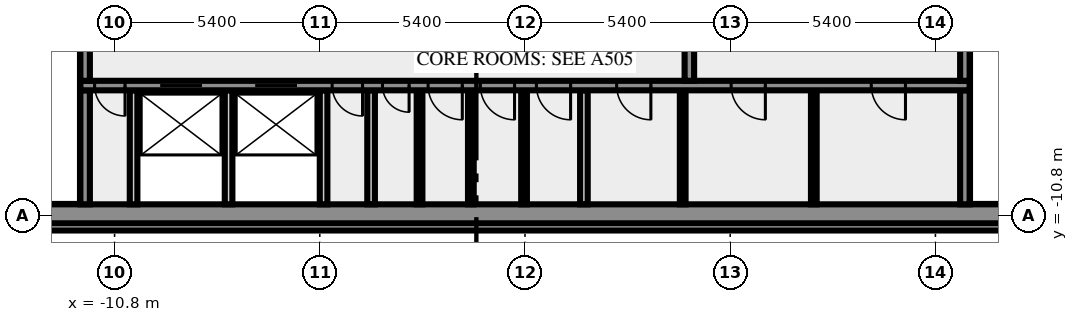
"""IFC4 building model, lengths in metres.
Left out: names, types, materials, properties, quantities, classifications, styles, units other than length and angle.
Written with IfcOpenShell. Run it as: python <this file> out.ifc"""

import sys

from ifc_helpers import new_model, si_unit, direction, frame, frame_2d, origin, place, context, subcontext, project, spatial, rectangle, extrude, element, fill, save


model = new_model("IFC4")
c1 = context("Model", 3, precision=1e-05, world=origin(), true_north=direction((0.0, 1.0)))
c2 = subcontext(c1, "Body", "Model", "MODEL_VIEW")
j1 = project(units=[si_unit("LENGTHUNIT", "METRE"), si_unit("PLANEANGLEUNIT", "RADIAN")], contexts=[c1])
p1 = place(None, origin())
s1 = spatial("IfcSite", under=j1, at=p1, CompositionType="ELEMENT")
p2 = place(p1, origin())
s2 = spatial("IfcBuilding", under=s1, at=p2, CompositionType="ELEMENT")
p3 = place(p2, frame((0.0, 0.0, 253.0)))
s3 = spatial("IfcBuildingStorey", under=s2, at=p3, CompositionType="ELEMENT", Elevation=253.0)
p4 = place(p3, frame((-17.444, -11.088, 0.0), z_axis=(0.0, 0.0, 1.0), x_axis=(1.0, 0.0, 0.0)))
e1 = element("IfcWall", 1, at=p4, inside=s3, PredefinedType="SOLIDWALL", context=c2, shape_type="SweptSolid", body=[
    extrude(rectangle(XDim=34.888, YDim=0.2, at=frame_2d((17.444, 0.0))), origin(), (0.0, 0.0, 1.0), 3.65),
])
p5 = place(p3, frame((-20.0, -10.75, 0.0), z_axis=(0.0, 0.0, 1.0), x_axis=(1.0, 0.0, 0.0)))
e2 = element("IfcWall", 2, at=p5, inside=s3, PredefinedType="SHEAR", context=c2, shape_type="SweptSolid", body=[
    extrude(rectangle(XDim=40.0, YDim=0.5, at=frame_2d((20.0, 0.0))), origin(), (0.0, 0.0, 1.0), 3.65),
])
p6 = place(p5, frame((0.8, 0.0, 1.0)))
e3 = element("IfcOpeningElement", 3, at=p6, cuts=e2, PredefinedType="OPENING", context=c2, shape_type="SweptSolid", body=[
    extrude(rectangle(XDim=1.2, YDim=1.2, at=frame_2d((0.6, 0.6))), frame((0.0, 0.26, 0.0), z_axis=(0.0, -1.0, 0.0), x_axis=(1.0, 0.0, 0.0)), (0.0, 0.0, 1.0), 0.52),
])
p7 = place(p5, frame((38.0, 0.0, 1.0)))
e4 = element("IfcOpeningElement", 4, at=p7, cuts=e2, PredefinedType="OPENING", context=c2, shape_type="SweptSolid", body=[
    extrude(rectangle(XDim=1.2, YDim=1.2, at=frame_2d((0.6, 0.6))), frame((0.0, 0.26, 0.0), z_axis=(0.0, -1.0, 0.0), x_axis=(1.0, 0.0, 0.0)), (0.0, 0.0, 1.0), 0.52),
])
p8 = place(p3, frame((-11.575, -10.5, 0.0), z_axis=(0.0, 0.0, 1.0), x_axis=(0.0, 1.0, 0.0)))
e5 = element("IfcWall", 5, at=p8, inside=s3, PredefinedType="SHEAR", context=c2, shape_type="SweptSolid", body=[
    extrude(rectangle(XDim=3.0, YDim=0.25, at=frame_2d((1.5, 0.0))), origin(), (0.0, 0.0, 1.0), 3.65),
])
for number, where, z_axis, x_axis in (
    (6, (-10.3, -10.5, 0.0), (0.0, 0.0, 1.0), (0.0, 1.0, 0.0)),
    (7, (-7.8, -10.5, 0.0), (0.0, 0.0, 1.0), (0.0, 1.0, 0.0)),
    (8, (-5.3, -10.5, 0.0), (0.0, 0.0, 1.0), (0.0, 1.0, 0.0)),
    (9, (-4.05, -10.5, 0.0), (0.0, 0.0, 1.0), (0.0, 1.0, 0.0)),
):
    element("IfcWall", number, at=place(p3, frame(where, z_axis=z_axis, x_axis=x_axis)), inside=s3, PredefinedType="SOLIDWALL", context=c2, shape_type="SweptSolid", body=[
        extrude(rectangle(XDim=3.0, YDim=0.2, at=frame_2d((1.5, 0.0))), origin(), (0.0, 0.0, 1.0), 3.65),
    ])
for number, where, z_axis, x_axis in (
    (10, (-2.775, -10.5, 0.0), (0.0, 0.0, 1.0), (0.0, 1.0, 0.0)),
    (11, (-1.425, -10.5, 0.0), (0.0, 0.0, 1.0), (0.0, 1.0, 0.0)),
    (12, (-0.025, -10.5, 0.0), (0.0, 0.0, 1.0), (0.0, 1.0, 0.0)),
):
    element("IfcWall", number, at=place(p3, frame(where, z_axis=z_axis, x_axis=x_axis)), inside=s3, PredefinedType="PARTITIONING", context=c2, shape_type="SweptSolid", body=[
        extrude(rectangle(XDim=3.0, YDim=0.15, at=frame_2d((1.5, 0.0))), origin(), (0.0, 0.0, 1.0), 3.65),
    ])
p9 = place(p3, frame((1.55, -10.5, 0.0), z_axis=(0.0, 0.0, 1.0), x_axis=(0.0, 1.0, 0.0)))
e13 = element("IfcWall", 13, at=p9, inside=s3, PredefinedType="SOLIDWALL", context=c2, shape_type="SweptSolid", body=[
    extrude(rectangle(XDim=3.0, YDim=0.2, at=frame_2d((1.5, 0.0))), origin(), (0.0, 0.0, 1.0), 3.65),
])
for number, where, z_axis, x_axis in (
    (14, (4.15, -10.5, 0.0), (0.0, 0.0, 1.0), (0.0, 1.0, 0.0)),
    (15, (7.6, -10.5, 0.0), (0.0, 0.0, 1.0), (0.0, 1.0, 0.0)),
):
    element("IfcWall", number, at=place(p3, frame(where, z_axis=z_axis, x_axis=x_axis)), inside=s3, PredefinedType="PARTITIONING", context=c2, shape_type="SweptSolid", body=[
        extrude(rectangle(XDim=3.0, YDim=0.15, at=frame_2d((1.5, 0.0))), origin(), (0.0, 0.0, 1.0), 3.65),
    ])
p10 = place(p3, frame((11.575, -10.5, 0.0), z_axis=(0.0, 0.0, 1.0), x_axis=(0.0, 1.0, 0.0)))
e16 = element("IfcWall", 16, at=p10, inside=s3, PredefinedType="SHEAR", context=c2, shape_type="SweptSolid", body=[
    extrude(rectangle(XDim=3.0, YDim=0.25, at=frame_2d((1.5, 0.0))), origin(), (0.0, 0.0, 1.0), 3.65),
])
p11 = place(p3, frame((11.7, -7.375, 0.0), z_axis=(0.0, 0.0, 1.0), x_axis=(-1.0, 0.0, 0.0)))
e17 = element("IfcWall", 17, at=p11, inside=s3, PredefinedType="SHEAR", context=c2, shape_type="SweptSolid", body=[
    extrude(rectangle(XDim=23.4, YDim=0.25, at=frame_2d((11.7, 0.0))), origin(), (0.0, 0.0, 1.0), 3.65),
])
p12 = place(p11, frame((22.225, 0.0, 0.0)))
e18 = element("IfcOpeningElement", 18, at=p12, cuts=e17, PredefinedType="OPENING", context=c2, shape_type="SweptSolid", body=[
    extrude(rectangle(XDim=0.8, YDim=2.1, at=frame_2d((0.4, 1.05))), frame((0.0, 0.135, 0.0), z_axis=(0.0, -1.0, 0.0), x_axis=(1.0, 0.0, 0.0)), (0.0, 0.0, 1.0), 0.27),
])
p13 = place(p11, frame((20.2, 0.0, 0.0)))
e19 = element("IfcOpeningElement", 19, at=p13, cuts=e17, PredefinedType="OPENING", context=c2, shape_type="SweptSolid", body=[
    extrude(rectangle(XDim=1.1, YDim=2.1, at=frame_2d((0.55, 1.05))), frame((0.0, 0.135, 0.0), z_axis=(0.0, -1.0, 0.0), x_axis=(1.0, 0.0, 0.0)), (0.0, 0.0, 1.0), 0.27),
])
p14 = place(p11, frame((17.7, 0.0, 0.0)))
e20 = element("IfcOpeningElement", 20, at=p14, cuts=e17, PredefinedType="OPENING", context=c2, shape_type="SweptSolid", body=[
    extrude(rectangle(XDim=1.1, YDim=2.1, at=frame_2d((0.55, 1.05))), frame((0.0, 0.135, 0.0), z_axis=(0.0, -1.0, 0.0), x_axis=(1.0, 0.0, 0.0)), (0.0, 0.0, 1.0), 0.27),
])
p15 = place(p11, frame((15.975, 0.0, 0.0)))
e21 = element("IfcOpeningElement", 21, at=p15, cuts=e17, PredefinedType="OPENING", context=c2, shape_type="SweptSolid", body=[
    extrude(rectangle(XDim=0.8, YDim=2.1, at=frame_2d((0.4, 1.05))), frame((0.0, 0.135, 0.0), z_axis=(0.0, -1.0, 0.0), x_axis=(1.0, 0.0, 0.0)), (0.0, 0.0, 1.0), 0.27),
])
p16 = place(p11, frame((14.75, 0.0, 0.0)))
e22 = element("IfcOpeningElement", 22, at=p16, cuts=e17, PredefinedType="OPENING", context=c2, shape_type="SweptSolid", body=[
    extrude(rectangle(XDim=0.7, YDim=2.1, at=frame_2d((0.35, 1.05))), frame((0.0, 0.135, 0.0), z_axis=(0.0, -1.0, 0.0), x_axis=(1.0, 0.0, 0.0)), (0.0, 0.0, 1.0), 0.27),
])
p17 = place(p11, frame((13.35, 0.0, 0.0)))
e23 = element("IfcOpeningElement", 23, at=p17, cuts=e17, PredefinedType="OPENING", context=c2, shape_type="SweptSolid", body=[
    extrude(rectangle(XDim=0.9, YDim=2.1, at=frame_2d((0.45, 1.05))), frame((0.0, 0.135, 0.0), z_axis=(0.0, -1.0, 0.0), x_axis=(1.0, 0.0, 0.0)), (0.0, 0.0, 1.0), 0.27),
])
p18 = place(p11, frame((11.975, 0.0, 0.0)))
e24 = element("IfcOpeningElement", 24, at=p18, cuts=e17, PredefinedType="OPENING", context=c2, shape_type="SweptSolid", body=[
    extrude(rectangle(XDim=0.9, YDim=2.1, at=frame_2d((0.45, 1.05))), frame((0.0, 0.135, 0.0), z_axis=(0.0, -1.0, 0.0), x_axis=(1.0, 0.0, 0.0)), (0.0, 0.0, 1.0), 0.27),
])
p19 = place(p11, frame((10.5, 0.0, 0.0)))
e25 = element("IfcOpeningElement", 25, at=p19, cuts=e17, PredefinedType="OPENING", context=c2, shape_type="SweptSolid", body=[
    extrude(rectangle(XDim=0.9, YDim=2.1, at=frame_2d((0.45, 1.05))), frame((0.0, 0.135, 0.0), z_axis=(0.0, -1.0, 0.0), x_axis=(1.0, 0.0, 0.0)), (0.0, 0.0, 1.0), 0.27),
])
p20 = place(p11, frame((8.388, 0.0, 0.0)))
e26 = element("IfcOpeningElement", 26, at=p20, cuts=e17, PredefinedType="OPENING", context=c2, shape_type="SweptSolid", body=[
    extrude(rectangle(XDim=0.9, YDim=2.1, at=frame_2d((0.45, 1.05))), frame((0.0, 0.135, 0.0), z_axis=(0.0, -1.0, 0.0), x_axis=(1.0, 0.0, 0.0)), (0.0, 0.0, 1.0), 0.27),
])
p21 = place(p11, frame((5.375, 0.0, 0.0)))
e27 = element("IfcOpeningElement", 27, at=p21, cuts=e17, PredefinedType="OPENING", context=c2, shape_type="SweptSolid", body=[
    extrude(rectangle(XDim=0.9, YDim=2.1, at=frame_2d((0.45, 1.05))), frame((0.0, 0.135, 0.0), z_axis=(0.0, -1.0, 0.0), x_axis=(1.0, 0.0, 0.0)), (0.0, 0.0, 1.0), 0.27),
])
p22 = place(p11, frame((1.688, 0.0, 0.0)))
e28 = element("IfcOpeningElement", 28, at=p22, cuts=e17, PredefinedType="OPENING", context=c2, shape_type="SweptSolid", body=[
    extrude(rectangle(XDim=0.9, YDim=2.1, at=frame_2d((0.45, 1.05))), frame((0.0, 0.135, 0.0), z_axis=(0.0, -1.0, 0.0), x_axis=(1.0, 0.0, 0.0)), (0.0, 0.0, 1.0), 0.27),
])
p23 = place(p3, frame((-11.575, -7.25, 0.0), z_axis=(0.0, 0.0, 1.0), x_axis=(0.0, 1.0, 0.0)))
e29 = element("IfcWall", 29, at=p23, inside=s3, PredefinedType="SHEAR", context=c2, shape_type="SweptSolid", body=[
    extrude(rectangle(XDim=1.0, YDim=0.25, at=frame_2d((0.5, 0.0))), origin(), (0.0, 0.0, 1.0), 3.65),
])
p24 = place(p3, frame((4.325, -7.25, 0.0), z_axis=(0.0, 0.0, 1.0), x_axis=(0.0, 1.0, 0.0)))
e30 = element("IfcWall", 30, at=p24, inside=s3, PredefinedType="SHEAR", context=c2, shape_type="SweptSolid", body=[
    extrude(rectangle(XDim=3.0, YDim=0.25, at=frame_2d((1.5, 0.0))), origin(), (0.0, 0.0, 1.0), 3.65),
])
p25 = place(p24, frame((0.8, 0.0, 0.0)))
e31 = element("IfcOpeningElement", 31, at=p25, cuts=e30, PredefinedType="OPENING", context=c2, shape_type="SweptSolid", body=[
    extrude(rectangle(XDim=1.4, YDim=2.1, at=frame_2d((0.7, 1.05))), frame((0.0, 0.135, 0.0), z_axis=(0.0, -1.0, 0.0), x_axis=(1.0, 0.0, 0.0)), (0.0, 0.0, 1.0), 0.27),
])
p26 = place(p3, frame((11.575, -7.25, 0.0), z_axis=(0.0, 0.0, 1.0), x_axis=(0.0, 1.0, 0.0)))
e32 = element("IfcWall", 32, at=p26, inside=s3, PredefinedType="SHEAR", context=c2, shape_type="SweptSolid", body=[
    extrude(rectangle(XDim=1.0, YDim=0.25, at=frame_2d((0.5, 0.0))), origin(), (0.0, 0.0, 1.0), 3.65),
])
p27 = place(p12, origin())
e33 = element("IfcDoor", 33, at=p27, inside=s3, OperationType="SINGLE_SWING_RIGHT", PredefinedType="DOOR", context=c2, shape_type="SweptSolid", body=[
    extrude(rectangle(XDim=0.8, YDim=2.1, at=frame_2d((0.4, 1.05))), frame((0.0, 0.025, 0.0), z_axis=(0.0, -1.0, 0.0), x_axis=(1.0, 0.0, 0.0)), (0.0, 0.0, 1.0), 0.05),
])
fill(e18, e33)
p28 = place(p13, origin())
e34 = element("IfcDoor", 34, at=p28, inside=s3, OperationType="DOUBLE_DOOR_SLIDING", PredefinedType="DOOR", context=c2, shape_type="SweptSolid", body=[
    extrude(rectangle(XDim=1.1, YDim=2.1, at=frame_2d((0.55, 1.05))), frame((0.0, 0.025, 0.0), z_axis=(0.0, -1.0, 0.0), x_axis=(1.0, 0.0, 0.0)), (0.0, 0.0, 1.0), 0.05),
])
fill(e19, e34)
p29 = place(p14, origin())
e35 = element("IfcDoor", 35, at=p29, inside=s3, OperationType="DOUBLE_DOOR_SLIDING", PredefinedType="DOOR", context=c2, shape_type="SweptSolid", body=[
    extrude(rectangle(XDim=1.1, YDim=2.1, at=frame_2d((0.55, 1.05))), frame((0.0, 0.025, 0.0), z_axis=(0.0, -1.0, 0.0), x_axis=(1.0, 0.0, 0.0)), (0.0, 0.0, 1.0), 0.05),
])
fill(e20, e35)
p30 = place(p15, origin())
e36 = element("IfcDoor", 36, at=p30, inside=s3, OperationType="SINGLE_SWING_RIGHT", PredefinedType="DOOR", context=c2, shape_type="SweptSolid", body=[
    extrude(rectangle(XDim=0.8, YDim=2.1, at=frame_2d((0.4, 1.05))), frame((0.0, 0.025, 0.0), z_axis=(0.0, -1.0, 0.0), x_axis=(1.0, 0.0, 0.0)), (0.0, 0.0, 1.0), 0.05),
])
fill(e21, e36)
p31 = place(p16, origin())
e37 = element("IfcDoor", 37, at=p31, inside=s3, OperationType="SINGLE_SWING_RIGHT", PredefinedType="DOOR", context=c2, shape_type="SweptSolid", body=[
    extrude(rectangle(XDim=0.7, YDim=2.1, at=frame_2d((0.35, 1.05))), frame((0.0, 0.025, 0.0), z_axis=(0.0, -1.0, 0.0), x_axis=(1.0, 0.0, 0.0)), (0.0, 0.0, 1.0), 0.05),
])
fill(e22, e37)
p32 = place(p17, origin())
e38 = element("IfcDoor", 38, at=p32, inside=s3, OperationType="SINGLE_SWING_RIGHT", PredefinedType="DOOR", context=c2, shape_type="SweptSolid", body=[
    extrude(rectangle(XDim=0.9, YDim=2.1, at=frame_2d((0.45, 1.05))), frame((0.0, 0.025, 0.0), z_axis=(0.0, -1.0, 0.0), x_axis=(1.0, 0.0, 0.0)), (0.0, 0.0, 1.0), 0.05),
])
fill(e23, e38)
p33 = place(p18, origin())
e39 = element("IfcDoor", 39, at=p33, inside=s3, OperationType="SINGLE_SWING_RIGHT", PredefinedType="DOOR", context=c2, shape_type="SweptSolid", body=[
    extrude(rectangle(XDim=0.9, YDim=2.1, at=frame_2d((0.45, 1.05))), frame((0.0, 0.025, 0.0), z_axis=(0.0, -1.0, 0.0), x_axis=(1.0, 0.0, 0.0)), (0.0, 0.0, 1.0), 0.05),
])
fill(e24, e39)
p34 = place(p19, origin())
e40 = element("IfcDoor", 40, at=p34, inside=s3, OperationType="SINGLE_SWING_LEFT", PredefinedType="DOOR", context=c2, shape_type="SweptSolid", body=[
    extrude(rectangle(XDim=0.9, YDim=2.1, at=frame_2d((0.45, 1.05))), frame((0.0, 0.025, 0.0), z_axis=(0.0, -1.0, 0.0), x_axis=(1.0, 0.0, 0.0)), (0.0, 0.0, 1.0), 0.05),
])
fill(e25, e40)
p35 = place(p20, origin())
e41 = element("IfcDoor", 41, at=p35, inside=s3, OperationType="SINGLE_SWING_LEFT", PredefinedType="DOOR", context=c2, shape_type="SweptSolid", body=[
    extrude(rectangle(XDim=0.9, YDim=2.1, at=frame_2d((0.45, 1.05))), frame((0.0, 0.025, 0.0), z_axis=(0.0, -1.0, 0.0), x_axis=(1.0, 0.0, 0.0)), (0.0, 0.0, 1.0), 0.05),
])
fill(e26, e41)
p36 = place(p21, origin())
e42 = element("IfcDoor", 42, at=p36, inside=s3, OperationType="SINGLE_SWING_LEFT", PredefinedType="DOOR", context=c2, shape_type="SweptSolid", body=[
    extrude(rectangle(XDim=0.9, YDim=2.1, at=frame_2d((0.45, 1.05))), frame((0.0, 0.025, 0.0), z_axis=(0.0, -1.0, 0.0), x_axis=(1.0, 0.0, 0.0)), (0.0, 0.0, 1.0), 0.05),
])
fill(e27, e42)
p37 = place(p22, origin())
e43 = element("IfcDoor", 43, at=p37, inside=s3, OperationType="SINGLE_SWING_LEFT", PredefinedType="DOOR", context=c2, shape_type="SweptSolid", body=[
    extrude(rectangle(XDim=0.9, YDim=2.1, at=frame_2d((0.45, 1.05))), frame((0.0, 0.025, 0.0), z_axis=(0.0, -1.0, 0.0), x_axis=(1.0, 0.0, 0.0)), (0.0, 0.0, 1.0), 0.05),
])
fill(e28, e43)
save(model, sys.argv[1])
